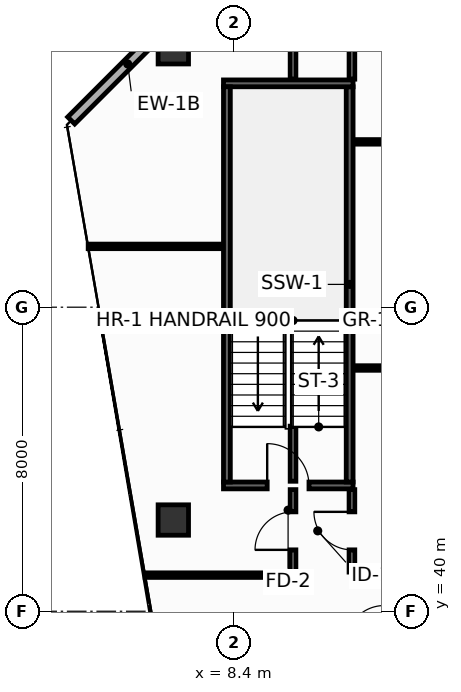
"""IFC4 building model, lengths in metres.
Left out: names, types, materials, properties, quantities, classifications, styles, units other than length and angle.
Written with IfcOpenShell. Run it as: python <this file> out.ifc"""

import sys

from ifc_helpers import new_model, si_unit, direction, frame, frame_2d, origin, origin_2d, place, context, subcontext, project, spatial, rectangle, hollow_rectangle, extrude, element, fill, save


model = new_model("IFC4")
c1 = context("Model", 3, precision=1e-05, world=origin(), true_north=direction((0.0, 1.0)))
c2 = subcontext(c1, "Body", "Model", "MODEL_VIEW")
j1 = project(units=[si_unit("LENGTHUNIT", "METRE"), si_unit("PLANEANGLEUNIT", "RADIAN")], contexts=[c1])
p1 = place(None, origin())
s1 = spatial("IfcSite", under=j1, at=p1, CompositionType="ELEMENT")
p2 = place(p1, origin())
s2 = spatial("IfcBuilding", under=s1, at=p2, CompositionType="ELEMENT")
p3 = place(p2, frame((0.0, 0.0, 230.6)))
s3 = spatial("IfcBuildingStorey", under=s2, at=p3, CompositionType="ELEMENT", Elevation=230.6)
for number, where, z_axis, x_axis in (
    (1, (6.8, 54.8, 0.0), (0.0, 0.0, 1.0), (1.0, 0.0, 0.0)),
    (2, (6.8, 42.4, 0.0), (0.0, 0.0, 1.0), (1.0, 0.0, 0.0)),
):
    element("IfcColumn", number, at=place(p3, frame(where, z_axis=z_axis, x_axis=x_axis)), inside=s3, PredefinedType="COLUMN", context=c2, shape_type="SweptSolid", body=[
        extrude(hollow_rectangle(XDim=0.8, YDim=0.8, WallThickness=0.036, at=origin_2d()), origin(), (0.0, 0.0, 1.0), 3.8),
    ])
p4 = place(p3, frame((8.12, 43.31, 0.0), z_axis=(0.0, 0.0, 1.0), x_axis=(1.0, 0.0, 0.0)))
e3 = element("IfcWall", 3, at=p4, inside=s3, PredefinedType="SHEAR", context=c2, shape_type="SweptSolid", body=[
    extrude(rectangle(XDim=3.41, YDim=0.18, at=frame_2d((1.705, 0.0))), origin(), (0.0, 0.0, 1.0), 3.55),
])
p5 = place(p4, frame((1.15, 0.0, 0.0)))
e4 = element("IfcOpeningElement", 4, at=p5, cuts=e3, PredefinedType="OPENING", context=c2, shape_type="SweptSolid", body=[
    extrude(rectangle(XDim=1.1, YDim=2.15, at=frame_2d((0.55, 1.075))), frame((0.0, 0.1, 0.0), z_axis=(0.0, -1.0, 0.0), x_axis=(1.0, 0.0, 0.0)), (0.0, 0.0, 1.0), 0.2),
])
p6 = place(p3, frame((11.44, 43.4, 0.0), z_axis=(0.0, 0.0, 1.0), x_axis=(0.0, 1.0, 0.0)))
e5 = element("IfcWall", 5, at=p6, inside=s3, PredefinedType="SHEAR", context=c2, shape_type="SweptSolid", body=[
    extrude(rectangle(XDim=10.4, YDim=0.18, at=frame_2d((5.2, 0.0))), origin(), (0.0, 0.0, 1.0), 3.55),
])
p7 = place(p3, frame((11.53, 53.89, 0.0), z_axis=(0.0, 0.0, 1.0), x_axis=(-1.0, 0.0, 0.0)))
e6 = element("IfcWall", 6, at=p7, inside=s3, PredefinedType="SHEAR", context=c2, shape_type="SweptSolid", body=[
    extrude(rectangle(XDim=3.41, YDim=0.18, at=frame_2d((1.705, 0.0))), origin(), (0.0, 0.0, 1.0), 3.55),
])
p8 = place(p3, frame((8.21, 53.8, 0.0), z_axis=(0.0, 0.0, 1.0), x_axis=(0.0, -1.0, 0.0)))
e7 = element("IfcWall", 7, at=p8, inside=s3, PredefinedType="SHEAR", context=c2, shape_type="SweptSolid", body=[
    extrude(rectangle(XDim=10.4, YDim=0.18, at=frame_2d((5.2, 0.0))), origin(), (0.0, 0.0, 1.0), 3.55),
])
p9 = place(p3, frame((7.087, 55.887, 0.0), z_axis=(0.0, 0.0, 1.0), x_axis=(-0.707106781187, -0.707106781187, 0.0)))
e8 = element("IfcWall", 8, at=p9, inside=s3, PredefinedType="STANDARD", context=c2, shape_type="SweptSolid", body=[
    extrude(rectangle(XDim=4.206, YDim=0.26, at=frame_2d((2.103, 0.0))), origin(), (0.0, 0.0, 1.0), 3.55),
])
p10 = place(p3, frame((6.059, 40.95, 0.0), z_axis=(0.0, 0.0, 1.0), x_axis=(1.0, 0.0, 0.0)))
e9 = element("IfcWall", 9, at=p10, inside=s3, PredefinedType="PARTITIONING", context=c2, shape_type="SweptSolid", body=[
    extrude(rectangle(XDim=3.891, YDim=0.12, at=frame_2d((1.945, 0.0))), origin(), (0.0, 0.0, 1.0), 3.085),
])
p11 = place(p3, frame((11.5, 40.95, 0.0), z_axis=(0.0, 0.0, 1.0), x_axis=(1.0, 0.0, 0.0)))
e10 = element("IfcWall", 10, at=p11, inside=s3, PredefinedType="PARTITIONING", context=c2, shape_type="SweptSolid", body=[
    extrude(rectangle(XDim=2.35, YDim=0.12, at=frame_2d((1.175, 0.0))), origin(), (0.0, 0.0, 1.0), 3.55),
])
p12 = place(p3, frame((11.55, 52.35, 0.0), z_axis=(0.0, 0.0, 1.0), x_axis=(1.0, 0.0, 0.0)))
e11 = element("IfcWall", 11, at=p12, inside=s3, PredefinedType="PARTITIONING", context=c2, shape_type="SweptSolid", body=[
    extrude(rectangle(XDim=2.13, YDim=0.12, at=frame_2d((1.065, 0.0))), origin(), (0.0, 0.0, 1.0), 3.55),
])
p13 = place(p3, frame((11.5, 54.0, 0.0), z_axis=(0.0, 0.0, 1.0), x_axis=(0.0, 1.0, 0.0)))
e12 = element("IfcWall", 12, at=p13, inside=s3, PredefinedType="PARTITIONING", context=c2, shape_type="SweptSolid", body=[
    extrude(rectangle(XDim=1.995, YDim=0.15, at=frame_2d((0.998, 0.0))), origin(), (0.0, 0.0, 1.0), 2.935),
])
p14 = place(p3, frame((4.56, 49.6, 0.0), z_axis=(0.0, 0.0, 1.0), x_axis=(1.0, 0.0, 0.0)))
e13 = element("IfcWall", 13, at=p14, inside=s3, PredefinedType="PARTITIONING", context=c2, shape_type="SweptSolid", body=[
    extrude(rectangle(XDim=3.54, YDim=0.12, at=frame_2d((1.77, 0.0))), origin(), (0.0, 0.0, 1.0), 2.947),
])
p15 = place(p3, frame((9.95, 41.03, 0.0), z_axis=(0.0, 0.0, 1.0), x_axis=(0.0, 1.0, 0.0)))
e14 = element("IfcWall", 14, at=p15, inside=s3, PredefinedType="PARTITIONING", context=c2, shape_type="SweptSolid", body=[
    extrude(rectangle(XDim=2.17, YDim=0.15, at=frame_2d((1.085, 0.0))), origin(), (0.0, 0.0, 1.0), 2.947),
])
p16 = place(p15, frame((0.585, 0.0, 0.0)))
e15 = element("IfcOpeningElement", 15, at=p16, cuts=e14, PredefinedType="OPENING", context=c2, shape_type="SweptSolid", body=[
    extrude(rectangle(XDim=1.0, YDim=2.15, at=frame_2d((0.5, 1.075))), frame((0.0, 0.085, 0.0), z_axis=(0.0, -1.0, 0.0), x_axis=(1.0, 0.0, 0.0)), (0.0, 0.0, 1.0), 0.17),
])
p17 = place(p3, frame((9.95, 43.42, 0.0), z_axis=(0.0, 0.0, 1.0), x_axis=(0.0, 1.0, 0.0)))
e16 = element("IfcWall", 16, at=p17, inside=s3, PredefinedType="PARTITIONING", context=c2, shape_type="SweptSolid", body=[
    extrude(rectangle(XDim=1.45, YDim=0.15, at=frame_2d((0.725, 0.0))), origin(), (0.0, 0.0, 1.0), 3.55),
])
p18 = place(p3, frame((9.95, 54.0, 0.0), z_axis=(0.0, 0.0, 1.0), x_axis=(0.0, 1.0, 0.0)))
e17 = element("IfcWall", 17, at=p18, inside=s3, PredefinedType="PARTITIONING", context=c2, shape_type="SweptSolid", body=[
    extrude(rectangle(XDim=1.995, YDim=0.15, at=frame_2d((0.998, 0.0))), origin(), (0.0, 0.0, 1.0), 2.935),
])
p19 = place(p3, frame((11.55, 46.4, 0.0), z_axis=(0.0, 0.0, 1.0), x_axis=(1.0, 0.0, 0.0)))
e18 = element("IfcWall", 18, at=p19, inside=s3, PredefinedType="PARTITIONING", context=c2, shape_type="SweptSolid", body=[
    extrude(rectangle(XDim=2.13, YDim=0.12, at=frame_2d((1.065, 0.0))), origin(), (0.0, 0.0, 1.0), 3.55),
])
p20 = place(p3, frame((11.5, 41.03, 0.0), z_axis=(0.0, 0.0, 1.0), x_axis=(0.0, 1.0, 0.0)))
e19 = element("IfcWall", 19, at=p20, inside=s3, PredefinedType="PARTITIONING", context=c2, shape_type="SweptSolid", body=[
    extrude(rectangle(XDim=2.17, YDim=0.15, at=frame_2d((1.085, 0.0))), origin(), (0.0, 0.0, 1.0), 2.947),
])
p21 = place(p20, frame((0.585, 0.0, 0.0)))
e20 = element("IfcOpeningElement", 20, at=p21, cuts=e19, PredefinedType="OPENING", context=c2, shape_type="SweptSolid", body=[
    extrude(rectangle(XDim=1.0, YDim=2.15, at=frame_2d((0.5, 1.075))), frame((0.0, 0.085, 0.0), z_axis=(0.0, -1.0, 0.0), x_axis=(1.0, 0.0, 0.0)), (0.0, 0.0, 1.0), 0.17),
])
p22 = place(p5, origin())
e21 = element("IfcDoor", 21, at=p22, inside=s3, OperationType="SINGLE_SWING_LEFT", PredefinedType="DOOR", context=c2, shape_type="SweptSolid", body=[
    extrude(rectangle(XDim=1.1, YDim=2.15, at=frame_2d((0.55, 1.075))), frame((0.0, 0.025, 0.0), z_axis=(0.0, -1.0, 0.0), x_axis=(1.0, 0.0, 0.0)), (0.0, 0.0, 1.0), 0.05),
])
fill(e4, e21)
p23 = place(p16, origin())
e22 = element("IfcDoor", 22, at=p23, inside=s3, OperationType="SINGLE_SWING_LEFT", PredefinedType="DOOR", context=c2, shape_type="SweptSolid", body=[
    extrude(rectangle(XDim=1.0, YDim=2.15, at=frame_2d((0.5, 1.075))), frame((0.0, 0.025, 0.0), z_axis=(0.0, -1.0, 0.0), x_axis=(1.0, 0.0, 0.0)), (0.0, 0.0, 1.0), 0.05),
])
fill(e15, e22)
p24 = place(p21, origin())
e23 = element("IfcDoor", 23, at=p24, inside=s3, OperationType="SINGLE_SWING_RIGHT", PredefinedType="DOOR", context=c2, shape_type="SweptSolid", body=[
    extrude(rectangle(XDim=1.0, YDim=2.15, at=frame_2d((0.5, 1.075))), frame((0.0, 0.025, 0.0), z_axis=(0.0, -1.0, 0.0), x_axis=(1.0, 0.0, 0.0)), (0.0, 0.0, 1.0), 0.05),
])
fill(e20, e23)
save(model, sys.argv[1])
